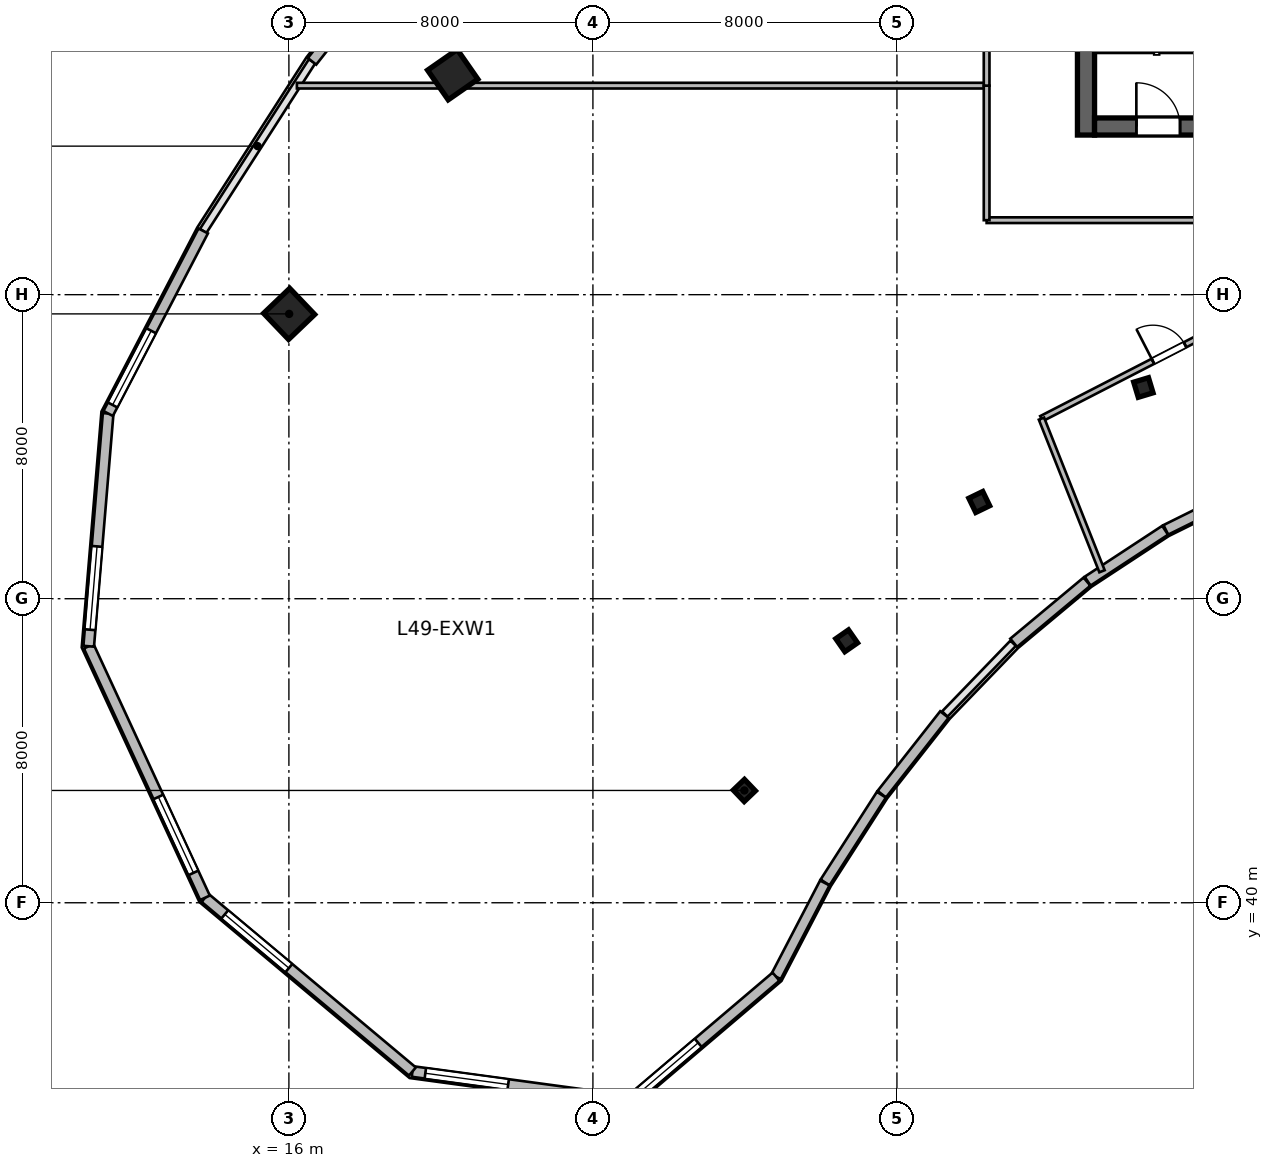
"""IFC4 building model, lengths in metres.
Left out: names, types, materials, properties, quantities, classifications, styles, units other than length and angle.
Written with IfcOpenShell. Run it as: python <this file> out.ifc"""

import sys

from ifc_helpers import new_model, si_unit, direction, frame, frame_2d, origin, origin_2d, place, context, subcontext, project, spatial, rectangle, i_section, extrude, source, transform, mapped, element, fill, save


model = new_model("IFC4")
c1 = context("Model", 3, precision=1e-05, world=origin(), true_north=direction((0.0, 1.0)))
c2 = subcontext(c1, "Body", "Model", "MODEL_VIEW")
j1 = project(units=[si_unit("LENGTHUNIT", "METRE"), si_unit("PLANEANGLEUNIT", "RADIAN")], contexts=[c1])
p1 = place(None, origin())
s1 = spatial("IfcSite", under=j1, at=p1, CompositionType="ELEMENT")
p2 = place(p1, origin())
s2 = spatial("IfcBuilding", under=s1, at=p2, CompositionType="ELEMENT")
p3 = place(p2, frame((0.0, 0.0, 204.0)))
s3 = spatial("IfcBuildingStorey", under=s2, at=p3, CompositionType="ELEMENT", Elevation=204.0)
m1 = source(origin(), c2, "Body", "SweptSolid", [
    extrude(rectangle(XDim=12.0, YDim=0.45, at=frame_2d((6.0, 0.0))), origin(), (0.0, 0.0, 1.0), 3.9),
])
p4 = place(p3, frame((36.975, 60.2, 0.0), z_axis=(0.0, 0.0, 1.0), x_axis=(0.0, 1.0, 0.0)))
e1 = element("IfcWall", 1, at=p4, inside=s3, PredefinedType="SHEAR", context=c2, shape_type="MappedRepresentation", body=[
    mapped(m1, transform((0.0, 0.0, 0.0), scale=1.0)),
])
m2 = source(origin(), c2, "Body", "SweptSolid", [
    extrude(rectangle(XDim=21.6, YDim=0.45, at=frame_2d((10.8, 0.0))), origin(), (0.0, 0.0, 1.0), 3.9),
])
p5 = place(p3, frame((37.2, 60.425, 0.0), z_axis=(0.0, 0.0, 1.0), x_axis=(1.0, 0.0, 0.0)))
e2 = element("IfcWall", 2, at=p5, inside=s3, PredefinedType="SHEAR", context=c2, shape_type="MappedRepresentation", body=[
    mapped(m2, transform((0.0, 0.0, 0.0), scale=1.0)),
])
p6 = place(p5, frame((1.1, 0.0, 0.0)))
e3 = element("IfcOpeningElement", 3, at=p6, cuts=e2, PredefinedType="OPENING", context=c2, shape_type="SweptSolid", body=[
    extrude(rectangle(XDim=1.15, YDim=2.15, at=frame_2d((0.575, 1.075))), frame((0.0, 0.235, 0.0), z_axis=(0.0, -1.0, 0.0), x_axis=(1.0, 0.0, 0.0)), (0.0, 0.0, 1.0), 0.47),
])
p7 = place(p5, frame((19.5, 0.0, 0.0)))
e4 = element("IfcOpeningElement", 4, at=p7, cuts=e2, PredefinedType="OPENING", context=c2, shape_type="SweptSolid", body=[
    extrude(rectangle(XDim=0.9, YDim=2.1, at=frame_2d((0.45, 1.05))), frame((0.0, 0.235, 0.0), z_axis=(0.0, -1.0, 0.0), x_axis=(1.0, 0.0, 0.0)), (0.0, 0.0, 1.0), 0.47),
])
p8 = place(p5, frame((12.02, 0.0, 0.0)))
e5 = element("IfcOpeningElement", 5, at=p8, cuts=e2, PredefinedType="OPENING", context=c2, shape_type="SweptSolid", body=[
    extrude(rectangle(XDim=1.6, YDim=2.15, at=frame_2d((0.8, 1.075))), frame((0.0, 0.235, 0.0), z_axis=(0.0, -1.0, 0.0), x_axis=(1.0, 0.0, 0.0)), (0.0, 0.0, 1.0), 0.47),
])
m3 = source(origin(), c2, "Body", "SweptSolid", [
    extrude(i_section(OverallWidth=0.406, OverallDepth=0.416, WebThickness=0.03, FlangeThickness=0.048, at=origin_2d()), origin(), (0.0, 0.0, 1.0), 3.9),
])
p9 = place(p3, frame((27.985, 42.955, 0.0), z_axis=(0.0, 0.0, 1.0), x_axis=(-0.690756218984, 0.723087716626, 0.0)))
e6 = element("IfcColumn", 6, at=p9, inside=s3, PredefinedType="COLUMN", context=c2, shape_type="MappedRepresentation", body=[
    mapped(m3, transform((0.0, 0.0, 0.0), scale=1.0)),
])
m4 = source(origin(), c2, "Body", "SweptSolid", [
    extrude(rectangle(XDim=0.95, YDim=0.95, at=origin_2d()), origin(), (0.0, 0.0, 1.0), 3.9),
])
p10 = place(p3, frame((16.007, 55.494, 0.0), z_axis=(0.0, 0.0, 1.0), x_axis=(-0.690756218984, 0.723087716626, 0.0)))
e7 = element("IfcColumn", 7, at=p10, inside=s3, PredefinedType="COLUMN", context=c2, shape_type="MappedRepresentation", body=[
    mapped(m4, transform((0.0, 0.0, 0.0), scale=1.0)),
])
p11 = place(p3, frame((30.677, 46.892, 0.0), z_axis=(0.0, 0.0, 1.0), x_axis=(-0.571143442153, 0.820850271661, 0.0)))
e8 = element("IfcColumn", 8, at=p11, inside=s3, PredefinedType="COLUMN", context=c2, shape_type="MappedRepresentation", body=[
    mapped(m3, transform((0.0, 0.0, 0.0), scale=1.0)),
])
p12 = place(p3, frame((20.311, 61.789, 0.0), z_axis=(0.0, 0.0, 1.0), x_axis=(-0.571143442153, 0.820850271661, 0.0)))
e9 = element("IfcColumn", 9, at=p12, inside=s3, PredefinedType="COLUMN", context=c2, shape_type="MappedRepresentation", body=[
    mapped(m4, transform((0.0, 0.0, 0.0), scale=1.0)),
])
for number, where, z_axis, x_axis in (
    (10, (34.166, 50.545, 0.0), (0.0, 0.0, 1.0), (-0.436, 0.9, 0.0)),
    (11, (38.485, 53.558, 0.0), (0.0, 0.0, 1.0), (-0.289, 0.957, 0.0)),
):
    element("IfcColumn", number, at=place(p3, frame(where, z_axis=z_axis, x_axis=x_axis)), inside=s3, PredefinedType="COLUMN", context=c2, shape_type="MappedRepresentation", body=[
        mapped(m3, transform((0.0, 0.0, 0.0), scale=1.0)),
    ])
m5 = source(origin(), c2, "Body", "SweptSolid", [
    extrude(rectangle(XDim=2.378, YDim=0.28, at=frame_2d((1.189, 0.0))), origin(), (0.0, 0.0, 1.0), 3.64),
])
p13 = place(p3, frame((41.207, 50.868, 0.0), z_axis=(0.0, 0.0, 1.0), x_axis=(-0.895941616831, -0.444171835252, 0.0)))
e12 = element("IfcWall", 12, at=p13, inside=s3, PredefinedType="SOLIDWALL", context=c2, shape_type="MappedRepresentation", body=[
    mapped(m5, transform((0.0, 0.0, 0.0), scale=1.0)),
])
m6 = source(origin(), c2, "Body", "SweptSolid", [
    extrude(rectangle(XDim=2.44, YDim=0.28, at=frame_2d((1.22, 0.0))), origin(), (0.0, 0.0, 1.0), 3.64),
])
p14 = place(p3, frame((39.057, 49.801, 0.0), z_axis=(0.0, 0.0, 1.0), x_axis=(-0.83598480459, -0.548752591333, 0.0)))
e13 = element("IfcWall", 13, at=p14, inside=s3, PredefinedType="SOLIDWALL", context=c2, shape_type="MappedRepresentation", body=[
    mapped(m6, transform((0.0, 0.0, 0.0), scale=1.0)),
])
m7 = source(origin(), c2, "Body", "SweptSolid", [
    extrude(rectangle(XDim=2.511, YDim=0.28, at=frame_2d((1.256, 0.0))), origin(), (0.0, 0.0, 1.0), 3.64),
])
p15 = place(p3, frame((37.001, 48.449, 0.0), z_axis=(0.0, 0.0, 1.0), x_axis=(-0.767910416122, -0.640557251782, 0.0)))
e14 = element("IfcWall", 14, at=p15, inside=s3, PredefinedType="SOLIDWALL", context=c2, shape_type="MappedRepresentation", body=[
    mapped(m7, transform((0.0, 0.0, 0.0), scale=1.0)),
])
m8 = source(origin(), c2, "Body", "SweptSolid", [
    extrude(rectangle(XDim=2.666, YDim=0.28, at=frame_2d((1.333, 0.0))), origin(), (0.0, 0.0, 1.0), 3.64),
])
p16 = place(p3, frame((33.249, 44.952, 0.0), z_axis=(0.0, 0.0, 1.0), x_axis=(-0.618161284122, -0.786051287648, 0.0)))
e15 = element("IfcWall", 15, at=p16, inside=s3, PredefinedType="SOLIDWALL", context=c2, shape_type="MappedRepresentation", body=[
    mapped(m8, transform((0.0, 0.0, 0.0), scale=1.0)),
])
m9 = source(origin(), c2, "Body", "SweptSolid", [
    extrude(rectangle(XDim=2.742, YDim=0.28, at=frame_2d((1.371, 0.0))), origin(), (0.0, 0.0, 1.0), 3.64),
])
p17 = place(p3, frame((31.591, 42.843, 0.0), z_axis=(0.0, 0.0, 1.0), x_axis=(-0.540172468355, -0.841554338371, 0.0)))
e16 = element("IfcWall", 16, at=p17, inside=s3, PredefinedType="SOLIDWALL", context=c2, shape_type="MappedRepresentation", body=[
    mapped(m9, transform((0.0, 0.0, 0.0), scale=1.0)),
])
m10 = source(origin(), c2, "Body", "SweptSolid", [
    extrude(rectangle(XDim=2.779, YDim=0.28, at=frame_2d((1.39, 0.0))), origin(), (0.0, 0.0, 1.0), 3.64),
])
p18 = place(p3, frame((30.101, 40.521, 0.0), z_axis=(0.0, 0.0, 1.0), x_axis=(-0.461770308601, -0.886999538948, 0.0)))
e17 = element("IfcWall", 17, at=p18, inside=s3, PredefinedType="SOLIDWALL", context=c2, shape_type="MappedRepresentation", body=[
    mapped(m10, transform((0.0, 0.0, 0.0), scale=1.0)),
])
m11 = source(origin(), c2, "Body", "SweptSolid", [
    extrude(rectangle(XDim=5.051, YDim=0.28, at=frame_2d((2.525, 0.0))), origin(), (0.0, 0.0, 1.0), 3.64),
])
p19 = place(p3, frame((28.818, 38.056, 0.0), z_axis=(0.0, 0.0, 1.0), x_axis=(-0.761904731537, -0.647689107568, 0.0)))
e18 = element("IfcWall", 18, at=p19, inside=s3, PredefinedType="SOLIDWALL", context=c2, shape_type="MappedRepresentation", body=[
    mapped(m11, transform((0.0, 0.0, 0.0), scale=1.0)),
])
p20 = place(p19, frame((2.688, 0.0, 0.95)))
e19 = element("IfcOpeningElement", 19, at=p20, cuts=e18, PredefinedType="OPENING", context=c2, shape_type="SweptSolid", body=[
    extrude(rectangle(XDim=2.2, YDim=2.1, at=frame_2d((1.1, 1.05))), frame((0.0, 0.15, 0.0), z_axis=(0.0, -1.0, 0.0), x_axis=(1.0, 0.0, 0.0)), (0.0, 0.0, 1.0), 0.3),
])
m12 = source(origin(), c2, "Body", "SweptSolid", [
    extrude(rectangle(XDim=5.771, YDim=0.28, at=frame_2d((2.886, 0.0))), origin(), (0.0, 0.0, 1.0), 3.64),
])
p21 = place(p3, frame((24.969, 34.784, 0.0), z_axis=(0.0, 0.0, 1.0), x_axis=(-0.990933615537, 0.134352408237, 0.0)))
e20 = element("IfcWall", 20, at=p21, inside=s3, PredefinedType="SOLIDWALL", context=c2, shape_type="MappedRepresentation", body=[
    mapped(m12, transform((0.0, 0.0, 0.0), scale=1.0)),
])
p22 = place(p21, frame((3.229, 0.0, 0.95)))
e21 = element("IfcOpeningElement", 21, at=p22, cuts=e20, PredefinedType="OPENING", context=c2, shape_type="SweptSolid", body=[
    extrude(rectangle(XDim=2.2, YDim=2.1, at=frame_2d((1.1, 1.05))), frame((0.0, 0.15, 0.0), z_axis=(0.0, -1.0, 0.0), x_axis=(1.0, 0.0, 0.0)), (0.0, 0.0, 1.0), 0.3),
])
m13 = source(origin(), c2, "Body", "SweptSolid", [
    extrude(rectangle(XDim=7.12, YDim=0.28, at=frame_2d((3.56, 0.0))), origin(), (0.0, 0.0, 1.0), 3.64),
])
p23 = place(p3, frame((19.25, 35.56, 0.0), z_axis=(0.0, 0.0, 1.0), x_axis=(-0.766709783564, 0.641993853387, 0.0)))
e22 = element("IfcWall", 22, at=p23, inside=s3, PredefinedType="SOLIDWALL", context=c2, shape_type="MappedRepresentation", body=[
    mapped(m13, transform((0.0, 0.0, 0.0), scale=1.0)),
])
p24 = place(p23, frame((4.24, 0.0, 0.95)))
e23 = element("IfcOpeningElement", 23, at=p24, cuts=e22, PredefinedType="OPENING", context=c2, shape_type="SweptSolid", body=[
    extrude(rectangle(XDim=2.2, YDim=2.1, at=frame_2d((1.1, 1.05))), frame((0.0, 0.15, 0.0), z_axis=(0.0, -1.0, 0.0), x_axis=(1.0, 0.0, 0.0)), (0.0, 0.0, 1.0), 0.3),
])
m14 = source(origin(), c2, "Body", "SweptSolid", [
    extrude(rectangle(XDim=7.292, YDim=0.28, at=frame_2d((3.646, 0.0))), origin(), (0.0, 0.0, 1.0), 3.64),
])
p25 = place(p3, frame((13.792, 40.131, 0.0), z_axis=(0.0, 0.0, 1.0), x_axis=(-0.419642001049, 0.907689699708, 0.0)))
e24 = element("IfcWall", 24, at=p25, inside=s3, PredefinedType="SOLIDWALL", context=c2, shape_type="MappedRepresentation", body=[
    mapped(m14, transform((0.0, 0.0, 0.0), scale=1.0)),
])
p26 = place(p25, frame((0.723, 0.0, 0.95)))
e25 = element("IfcOpeningElement", 25, at=p26, cuts=e24, PredefinedType="OPENING", context=c2, shape_type="SweptSolid", body=[
    extrude(rectangle(XDim=2.2, YDim=2.1, at=frame_2d((1.1, 1.05))), frame((0.0, 0.15, 0.0), z_axis=(0.0, -1.0, 0.0), x_axis=(1.0, 0.0, 0.0)), (0.0, 0.0, 1.0), 0.3),
])
m15 = source(origin(), c2, "Body", "SweptSolid", [
    extrude(rectangle(XDim=6.146, YDim=0.28, at=frame_2d((3.073, 0.0))), origin(), (0.0, 0.0, 1.0), 3.64),
])
p27 = place(p3, frame((10.732, 46.749, 0.0), z_axis=(0.0, 0.0, 1.0), x_axis=(0.083301904456, 0.996524356307, 0.0)))
e26 = element("IfcWall", 26, at=p27, inside=s3, PredefinedType="SOLIDWALL", context=c2, shape_type="MappedRepresentation", body=[
    mapped(m15, transform((0.0, 0.0, 0.0), scale=1.0)),
])
p28 = place(p27, frame((0.436, 0.0, 0.95)))
e27 = element("IfcOpeningElement", 27, at=p28, cuts=e26, PredefinedType="OPENING", context=c2, shape_type="SweptSolid", body=[
    extrude(rectangle(XDim=2.2, YDim=2.1, at=frame_2d((1.1, 1.05))), frame((0.0, 0.15, 0.0), z_axis=(0.0, -1.0, 0.0), x_axis=(1.0, 0.0, 0.0)), (0.0, 0.0, 1.0), 0.3),
])
m16 = source(origin(), c2, "Body", "SweptSolid", [
    extrude(rectangle(XDim=5.416, YDim=0.28, at=frame_2d((2.708, 0.0))), origin(), (0.0, 0.0, 1.0), 3.64),
])
p29 = place(p3, frame((11.244, 52.874, 0.0), z_axis=(0.0, 0.0, 1.0), x_axis=(0.46177852435, 0.886995261796, 0.0)))
e28 = element("IfcWall", 28, at=p29, inside=s3, PredefinedType="SOLIDWALL", context=c2, shape_type="MappedRepresentation", body=[
    mapped(m16, transform((0.0, 0.0, 0.0), scale=1.0)),
])
p30 = place(p29, frame((0.254, 0.0, 0.95)))
e29 = element("IfcOpeningElement", 29, at=p30, cuts=e28, PredefinedType="OPENING", context=c2, shape_type="SweptSolid", body=[
    extrude(rectangle(XDim=2.2, YDim=2.1, at=frame_2d((1.1, 1.05))), frame((0.0, 0.15, 0.0), z_axis=(0.0, -1.0, 0.0), x_axis=(1.0, 0.0, 0.0)), (0.0, 0.0, 1.0), 0.3),
])
m17 = source(origin(), c2, "Body", "SweptSolid", [
    extrude(rectangle(XDim=5.153, YDim=0.28, at=frame_2d((2.577, 0.0))), origin(), (0.0, 0.0, 1.0), 3.64),
])
p31 = place(p3, frame((16.609, 62.14, 0.0), z_axis=(0.0, 0.0, 1.0), x_axis=(0.618179283891, 0.786037132054, 0.0)))
e30 = element("IfcWall", 30, at=p31, inside=s3, PredefinedType="SOLIDWALL", context=c2, shape_type="MappedRepresentation", body=[
    mapped(m17, transform((0.0, 0.0, 0.0), scale=1.0)),
])
m18 = source(origin(), c2, "Body", "SweptSolid", [
    extrude(rectangle(XDim=6.648, YDim=0.15, at=frame_2d((3.324, 0.0))), origin(), (0.0, 0.0, 1.0), 3.64),
])
p32 = place(p3, frame((35.803, 52.738, 0.0), z_axis=(0.0, 0.0, 1.0), x_axis=(0.889264330224, 0.457393649925, 0.0)))
e31 = element("IfcWall", 31, at=p32, inside=s3, PredefinedType="PARTITIONING", context=c2, shape_type="MappedRepresentation", body=[
    mapped(m18, transform((0.0, 0.0, 0.0), scale=1.0)),
])
p33 = place(p32, frame((3.299, 0.0, 0.0)))
e32 = element("IfcOpeningElement", 32, at=p33, cuts=e31, PredefinedType="OPENING", context=c2, shape_type="SweptSolid", body=[
    extrude(rectangle(XDim=0.95, YDim=2.1, at=frame_2d((0.475, 1.05))), frame((0.0, 0.085, 0.0), z_axis=(0.0, -1.0, 0.0), x_axis=(1.0, 0.0, 0.0)), (0.0, 0.0, 1.0), 0.17),
])
m19 = source(origin(), c2, "Body", "SweptSolid", [
    extrude(rectangle(XDim=4.32, YDim=0.15, at=frame_2d((2.16, 0.0))), origin(), (0.0, 0.0, 1.0), 3.64),
])
p34 = place(p3, frame((37.396, 48.723, 0.0), z_axis=(0.0, 0.0, 1.0), x_axis=(-0.368846295269, 0.929490403644, 0.0)))
e33 = element("IfcWall", 33, at=p34, inside=s3, PredefinedType="PARTITIONING", context=c2, shape_type="MappedRepresentation", body=[
    mapped(m19, transform((0.0, 0.0, 0.0), scale=1.0)),
])
m20 = source(origin(), c2, "Body", "SweptSolid", [
    extrude(rectangle(XDim=12.39, YDim=0.15, at=frame_2d((6.195, 0.0))), origin(), (0.0, 0.0, 1.0), 3.64),
])
p35 = place(p3, frame((34.36, 57.96, 0.0), z_axis=(0.0, 0.0, 1.0), x_axis=(1.0, 0.0, 0.0)))
e34 = element("IfcWall", 34, at=p35, inside=s3, PredefinedType="PARTITIONING", context=c2, shape_type="MappedRepresentation", body=[
    mapped(m20, transform((0.0, 0.0, 0.0), scale=1.0)),
])
m21 = source(origin(), c2, "Body", "SweptSolid", [
    extrude(rectangle(XDim=18.15, YDim=0.15, at=frame_2d((9.075, 0.0))), origin(), (0.0, 0.0, 1.0), 3.64),
])
p36 = place(p3, frame((16.21, 61.5, 0.0), z_axis=(0.0, 0.0, 1.0), x_axis=(1.0, 0.0, 0.0)))
e35 = element("IfcWall", 35, at=p36, inside=s3, PredefinedType="PARTITIONING", context=c2, shape_type="MappedRepresentation", body=[
    mapped(m21, transform((0.0, 0.0, 0.0), scale=1.0)),
])
m22 = source(origin(), c2, "Body", "SweptSolid", [
    extrude(rectangle(XDim=3.54, YDim=0.15, at=frame_2d((1.77, 0.0))), origin(), (0.0, 0.0, 1.0), 3.64),
])
p37 = place(p3, frame((34.36, 57.96, 0.0), z_axis=(0.0, 0.0, 1.0), x_axis=(0.0, 1.0, 0.0)))
e36 = element("IfcWall", 36, at=p37, inside=s3, PredefinedType="PARTITIONING", context=c2, shape_type="MappedRepresentation", body=[
    mapped(m22, transform((0.0, 0.0, 0.0), scale=1.0)),
])
m23 = source(origin(), c2, "Body", "SweptSolid", [
    extrude(rectangle(XDim=4.7, YDim=0.15, at=frame_2d((2.35, 0.0))), origin(), (0.0, 0.0, 1.0), 3.64),
])
p38 = place(p3, frame((34.36, 61.5, 0.0), z_axis=(0.0, 0.0, 1.0), x_axis=(0.0, 1.0, 0.0)))
e37 = element("IfcWall", 37, at=p38, inside=s3, PredefinedType="PARTITIONING", context=c2, shape_type="MappedRepresentation", body=[
    mapped(m23, transform((0.0, 0.0, 0.0), scale=1.0)),
])
p39 = place(p38, frame((1.875, 0.0, 0.0)))
e38 = element("IfcOpeningElement", 38, at=p39, cuts=e37, PredefinedType="OPENING", context=c2, shape_type="SweptSolid", body=[
    extrude(rectangle(XDim=0.95, YDim=2.1, at=frame_2d((0.475, 1.05))), frame((0.0, 0.085, 0.0), z_axis=(0.0, -1.0, 0.0), x_axis=(1.0, 0.0, 0.0)), (0.0, 0.0, 1.0), 0.17),
])
m24 = source(origin(), c2, "Body", "SweptSolid", [
    extrude(rectangle(XDim=2.2, YDim=2.1, at=frame_2d((1.1, 1.05))), frame((0.0, 0.03, 0.0), z_axis=(0.0, -1.0, 0.0), x_axis=(1.0, 0.0, 0.0)), (0.0, 0.0, 1.0), 0.06),
])
p40 = place(p20, origin())
e39 = element("IfcWindow", 39, at=p40, inside=s3, PartitioningType="TRIPLE_PANEL_VERTICAL", PredefinedType="WINDOW", context=c2, shape_type="MappedRepresentation", body=[
    mapped(m24, transform((0.0, 0.0, 0.0), scale=1.0)),
])
fill(e19, e39)
p41 = place(p22, origin())
e40 = element("IfcWindow", 40, at=p41, inside=s3, PartitioningType="TRIPLE_PANEL_VERTICAL", PredefinedType="WINDOW", context=c2, shape_type="MappedRepresentation", body=[
    mapped(m24, transform((0.0, 0.0, 0.0), scale=1.0)),
])
fill(e21, e40)
p42 = place(p24, origin())
e41 = element("IfcWindow", 41, at=p42, inside=s3, PartitioningType="TRIPLE_PANEL_VERTICAL", PredefinedType="WINDOW", context=c2, shape_type="MappedRepresentation", body=[
    mapped(m24, transform((0.0, 0.0, 0.0), scale=1.0)),
])
fill(e23, e41)
p43 = place(p26, origin())
e42 = element("IfcWindow", 42, at=p43, inside=s3, PartitioningType="TRIPLE_PANEL_VERTICAL", PredefinedType="WINDOW", context=c2, shape_type="MappedRepresentation", body=[
    mapped(m24, transform((0.0, 0.0, 0.0), scale=1.0)),
])
fill(e25, e42)
p44 = place(p28, origin())
e43 = element("IfcWindow", 43, at=p44, inside=s3, PartitioningType="TRIPLE_PANEL_VERTICAL", PredefinedType="WINDOW", context=c2, shape_type="MappedRepresentation", body=[
    mapped(m24, transform((0.0, 0.0, 0.0), scale=1.0)),
])
fill(e27, e43)
p45 = place(p30, origin())
e44 = element("IfcWindow", 44, at=p45, inside=s3, PartitioningType="TRIPLE_PANEL_VERTICAL", PredefinedType="WINDOW", context=c2, shape_type="MappedRepresentation", body=[
    mapped(m24, transform((0.0, 0.0, 0.0), scale=1.0)),
])
fill(e29, e44)
m25 = source(origin(), c2, "Body", "SweptSolid", [
    extrude(rectangle(XDim=1.15, YDim=2.15, at=frame_2d((0.575, 1.075))), frame((0.0, 0.025, 0.0), z_axis=(0.0, -1.0, 0.0), x_axis=(1.0, 0.0, 0.0)), (0.0, 0.0, 1.0), 0.05),
])
p46 = place(p6, origin())
e45 = element("IfcDoor", 45, at=p46, inside=s3, OperationType="SINGLE_SWING_LEFT", PredefinedType="DOOR", context=c2, shape_type="MappedRepresentation", body=[
    mapped(m25, transform((0.0, 0.0, 0.0), scale=1.0)),
])
fill(e3, e45)
m26 = source(origin(), c2, "Body", "SweptSolid", [
    extrude(rectangle(XDim=0.95, YDim=2.1, at=frame_2d((0.475, 1.05))), frame((0.0, 0.025, 0.0), z_axis=(0.0, -1.0, 0.0), x_axis=(1.0, 0.0, 0.0)), (0.0, 0.0, 1.0), 0.05),
])
p47 = place(p33, origin())
e46 = element("IfcDoor", 46, at=p47, inside=s3, OperationType="SINGLE_SWING_LEFT", PredefinedType="DOOR", context=c2, shape_type="MappedRepresentation", body=[
    mapped(m26, transform((0.0, 0.0, 0.0), scale=1.0)),
])
fill(e32, e46)
save(model, sys.argv[1])
